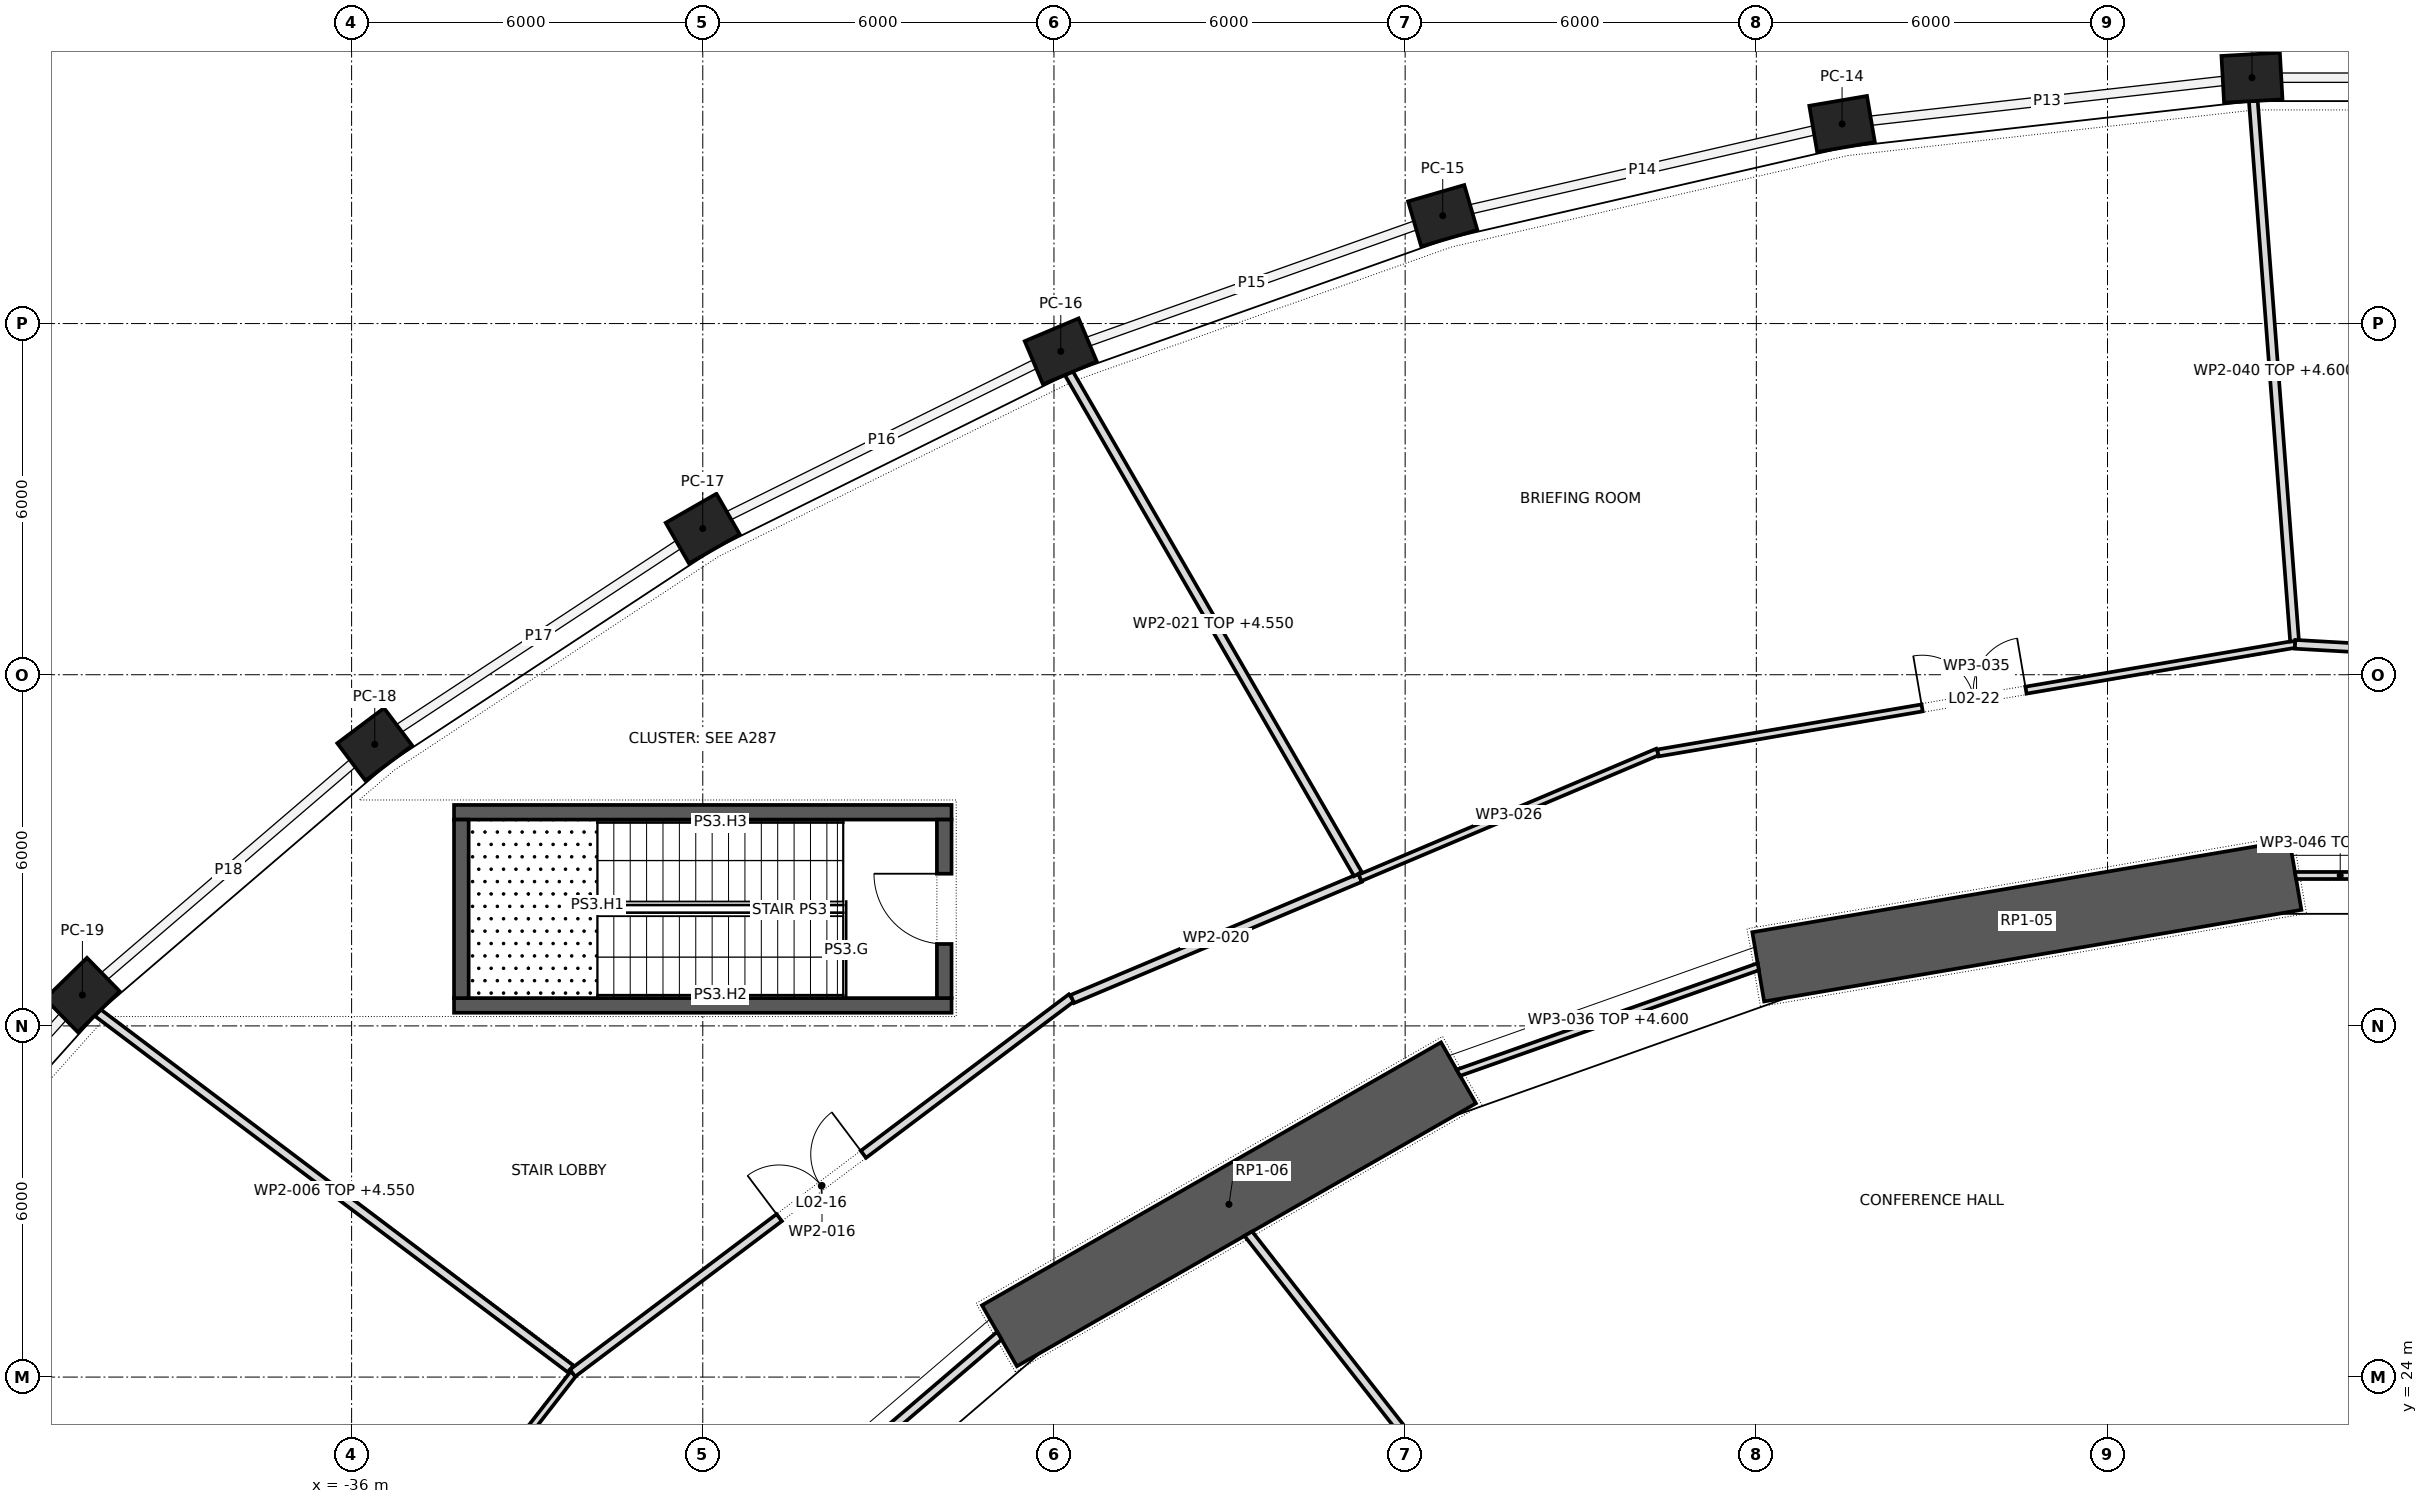
"""IFC4 building model, lengths in metres.
Left out: names, types, materials, properties, quantities, classifications, styles, units other than length and angle.
Written with IfcOpenShell. Run it as: python <this file> out.ifc"""

import sys

from ifc_helpers import new_model, si_unit, direction, frame, frame_2d, origin, origin_2d, place, context, subcontext, project, spatial, polyline, rectangle, outline, extrude, element, fill, save


model = new_model("IFC4")
c1 = context("Model", 3, precision=1e-05, world=origin(), true_north=direction((0.0, 1.0)))
c2 = subcontext(c1, "Body", "Model", "MODEL_VIEW")
j1 = project(units=[si_unit("LENGTHUNIT", "METRE"), si_unit("PLANEANGLEUNIT", "RADIAN")], contexts=[c1])
p1 = place(None, origin())
s1 = spatial("IfcSite", under=j1, at=p1, CompositionType="ELEMENT")
p2 = place(p1, origin())
s2 = spatial("IfcBuilding", under=s1, at=p2, CompositionType="ELEMENT")
p3 = place(p2, frame((0.0, 0.0, 12.5)))
s3 = spatial("IfcBuildingStorey", under=s2, at=p3, CompositionType="ELEMENT", Elevation=12.5)
for number, where, z_axis, x_axis in (
    (1, (-3.532, 46.201, 0.0), (0.0, 0.0, 1.0), (-0.998, -0.056, 0.0)),
    (2, (-10.535, 45.41, 0.0), (0.0, 0.0, 1.0), (-0.986, -0.168, 0.0)),
    (3, (-17.358, 43.843, 0.0), (0.0, 0.0, 1.0), (-0.96, -0.279, 0.0)),
    (4, (-23.884, 41.525, 0.0), (0.0, 0.0, 1.0), (-0.921, -0.389, 0.0)),
    (5, (-30.001, 38.497, 0.0), (0.0, 0.0, 1.0), (-0.868, -0.497, 0.0)),
    (6, (-35.605, 34.81, 0.0), (0.0, 0.0, 1.0), (-0.799, -0.601, 0.0)),
    (7, (-40.599, 30.528, 0.0), (0.0, 0.0, 1.0), (-0.715, -0.699, 0.0)),
):
    element("IfcColumn", number, at=place(p3, frame(where, z_axis=z_axis, x_axis=x_axis)), inside=s3, PredefinedType="COLUMN", context=c2, shape_type="SweptSolid", body=[
        extrude(rectangle(XDim=1.0, YDim=0.8, at=origin_2d()), origin(), (0.0, 0.0, 1.0), 5.5),
    ])
p4 = place(p3, frame((-2.788, 32.574, 0.0), z_axis=(0.0, 0.0, 1.0), x_axis=(-0.985776286846, -0.168062822456, 0.0)))
e8 = element("IfcWall", 8, at=p4, inside=s3, PredefinedType="SHEAR", context=c2, shape_type="SweptSolid", body=[
    extrude(rectangle(XDim=9.312, YDim=1.2, at=frame_2d((4.656, 0.0))), origin(), (0.0, 0.0, 1.0), 5.5),
])
p5 = place(p3, frame((-17.089, 29.198, 0.0), z_axis=(0.0, 0.0, 1.0), x_axis=(-0.867760656864, -0.496982336103, 0.0)))
e9 = element("IfcWall", 9, at=p5, inside=s3, PredefinedType="SHEAR", context=c2, shape_type="SweptSolid", body=[
    extrude(rectangle(XDim=9.038, YDim=1.2, at=frame_2d((4.519, 0.0))), origin(), (0.0, 0.0, 1.0), 5.5),
])
for number, where, z_axis, x_axis in (
    (10, (-34.25, 33.65, 0.0), (0.0, 0.0, 1.0), (1.0, 0.0, 0.0)),
    (11, (-34.25, 30.35, 0.0), (0.0, 0.0, 1.0), (1.0, 0.0, 0.0)),
):
    element("IfcWall", number, at=place(p3, frame(where, z_axis=z_axis, x_axis=x_axis)), inside=s3, PredefinedType="SHEAR", context=c2, shape_type="SweptSolid", body=[
        extrude(rectangle(XDim=8.5, YDim=0.25, at=frame_2d((4.25, 0.0))), origin(), (0.0, 0.0, 1.0), 5.15),
    ])
p6 = place(p3, frame((-34.125, 30.475, 0.0), z_axis=(0.0, 0.0, 1.0), x_axis=(0.0, 1.0, 0.0)))
e12 = element("IfcWall", 12, at=p6, inside=s3, PredefinedType="SHEAR", context=c2, shape_type="SweptSolid", body=[
    extrude(rectangle(XDim=3.05, YDim=0.25, at=frame_2d((1.525, 0.0))), origin(), (0.0, 0.0, 1.0), 5.15),
])
p7 = place(p3, frame((-25.875, 30.475, 0.0), z_axis=(0.0, 0.0, 1.0), x_axis=(0.0, 1.0, 0.0)))
e13 = element("IfcWall", 13, at=p7, inside=s3, PredefinedType="SHEAR", context=c2, shape_type="SweptSolid", body=[
    extrude(rectangle(XDim=3.05, YDim=0.25, at=frame_2d((1.525, 0.0))), origin(), (0.0, 0.0, 1.0), 5.15),
])
p8 = place(p7, frame((0.925, 0.0, 0.0)))
e14 = element("IfcOpeningElement", 14, at=p8, cuts=e13, PredefinedType="OPENING", context=c2, shape_type="SweptSolid", body=[
    extrude(rectangle(XDim=1.2, YDim=2.1, at=frame_2d((0.6, 1.05))), frame((0.0, 0.137, 0.0), z_axis=(0.0, -1.0, 0.0), x_axis=(1.0, 0.0, 0.0)), (0.0, 0.0, 1.0), 0.274),
])
p9 = place(p3, frame((-40.338, 30.225, 0.0), z_axis=(0.0, 0.0, 1.0), x_axis=(0.79878223103, -0.601620268435, 0.0)))
e15 = element("IfcWall", 15, at=p9, inside=s3, PredefinedType="PARTITIONING", context=c2, shape_type="SweptSolid", body=[
    extrude(outline(polyline([(-0.011, -0.075), (10.118, -0.075), (10.118, 0.075), (0.011, 0.075), (-0.011, -0.075)])), origin(), (0.0, 0.0, 1.0), 4.55),
])
p10 = place(p3, frame((-38.308, 16.228, 0.0), z_axis=(0.0, 0.0, 1.0), x_axis=(0.614374815397, 0.789014313055, 0.0)))
e16 = element("IfcWall", 16, at=p10, inside=s3, PredefinedType="PARTITIONING", context=c2, shape_type="SweptSolid", body=[
    extrude(rectangle(XDim=9.924, YDim=0.12, at=frame_2d((4.962, 0.0))), origin(), (0.0, 0.0, 1.0), 5.15),
])
p11 = place(p10, frame((4.052, 0.0, 0.0)))
e17 = element("IfcOpeningElement", 17, at=p11, cuts=e16, PredefinedType="OPENING", context=c2, shape_type="SweptSolid", body=[
    extrude(rectangle(XDim=1.8, YDim=2.1, at=frame_2d((0.9, 1.05))), frame((0.0, 0.072, 0.0), z_axis=(0.0, -1.0, 0.0), x_axis=(1.0, 0.0, 0.0)), (0.0, 0.0, 1.0), 0.144),
])
p12 = place(p3, frame((-32.225, 24.069, 0.0), z_axis=(0.0, 0.0, 1.0), x_axis=(0.799199975682, 0.601065220147, 0.0)))
e18 = element("IfcWall", 18, at=p12, inside=s3, PredefinedType="PARTITIONING", context=c2, shape_type="SweptSolid", body=[
    extrude(rectangle(XDim=10.666, YDim=0.15, at=frame_2d((5.333, 0.0))), origin(), (0.0, 0.0, 1.0), 5.15),
])
p13 = place(p12, frame((4.418, 0.0, 0.0)))
e19 = element("IfcOpeningElement", 19, at=p13, cuts=e18, PredefinedType="OPENING", context=c2, shape_type="SweptSolid", body=[
    extrude(rectangle(XDim=1.8, YDim=2.1, at=frame_2d((0.9, 1.05))), frame((0.0, 0.087, 0.0), z_axis=(0.0, -1.0, 0.0), x_axis=(1.0, 0.0, 0.0)), (0.0, 0.0, 1.0), 0.174),
])
p14 = place(p3, frame((-24.932, 24.708, 0.0), z_axis=(0.0, 0.0, 1.0), x_axis=(-0.760084552743, -0.649824185978, 0.0)))
e20 = element("IfcWall", 20, at=p14, inside=s3, PredefinedType="PARTITIONING", context=c2, shape_type="SweptSolid", body=[
    extrude(outline(polyline([(-0.014, -0.075), (5.09, -0.075), (5.06, 0.075), (0.014, 0.075), (-0.014, -0.075)])), origin(), (0.0, 0.0, 1.0), 4.6),
])
p15 = place(p3, frame((-23.687, 30.459, 0.0), z_axis=(0.0, 0.0, 1.0), x_axis=(0.921600059119, 0.388140864934, 0.0)))
e21 = element("IfcWall", 21, at=p15, inside=s3, PredefinedType="PARTITIONING", context=c2, shape_type="SweptSolid", body=[
    extrude(rectangle(XDim=5.336, YDim=0.15, at=frame_2d((2.668, 0.0))), origin(), (0.0, 0.0, 1.0), 5.15),
])
p16 = place(p3, frame((-23.745, 41.15, 0.0), z_axis=(0.0, 0.0, 1.0), x_axis=(0.49985011379, -0.866111923336, 0.0)))
e22 = element("IfcWall", 22, at=p16, inside=s3, PredefinedType="PARTITIONING", context=c2, shape_type="SweptSolid", body=[
    extrude(outline(polyline([(-0.009, -0.075), (9.878, -0.075), (9.878, 0.075), (0.009, 0.075), (-0.009, -0.075)])), origin(), (0.0, 0.0, 1.0), 4.55),
])
p17 = place(p3, frame((-20.68, 26.45, 0.0), z_axis=(0.0, 0.0, 1.0), x_axis=(0.616461511357, -0.787385042413, 0.0)))
e23 = element("IfcWall", 23, at=p17, inside=s3, PredefinedType="PARTITIONING", context=c2, shape_type="SweptSolid", body=[
    extrude(outline(polyline([(-0.011, -0.075), (14.518, -0.075), (14.518, 0.075), (0.011, 0.075), (-0.011, -0.075)])), origin(), (0.0, 0.0, 1.0), 5.15),
])
p18 = place(p3, frame((-18.77, 32.53, 0.0), z_axis=(0.0, 0.0, 1.0), x_axis=(0.920949546313, 0.389681835792, 0.0)))
e24 = element("IfcWall", 24, at=p18, inside=s3, PredefinedType="PARTITIONING", context=c2, shape_type="SweptSolid", body=[
    extrude(rectangle(XDim=5.52, YDim=0.12, at=frame_2d((2.76, 0.0))), origin(), (0.0, 0.0, 1.0), 5.15),
])
p19 = place(p3, frame((-13.68, 34.664, 0.0), z_axis=(0.0, 0.0, 1.0), x_axis=(0.985752612564, 0.168201625505, 0.0)))
e25 = element("IfcWall", 25, at=p19, inside=s3, PredefinedType="PARTITIONING", context=c2, shape_type="SweptSolid", body=[
    extrude(rectangle(XDim=11.043, YDim=0.12, at=frame_2d((5.521, 0.0))), origin(), (0.0, 0.0, 1.0), 5.15),
])
p20 = place(p19, frame((4.578, 0.0, 0.0)))
e26 = element("IfcOpeningElement", 26, at=p20, cuts=e25, PredefinedType="OPENING", context=c2, shape_type="SweptSolid", body=[
    extrude(rectangle(XDim=1.8, YDim=2.1, at=frame_2d((0.9, 1.05))), frame((0.0, 0.072, 0.0), z_axis=(0.0, -1.0, 0.0), x_axis=(1.0, 0.0, 0.0)), (0.0, 0.0, 1.0), 0.144),
])
p21 = place(p3, frame((-11.967, 31.011, 0.0), z_axis=(0.0, 0.0, 1.0), x_axis=(-0.942814385805, -0.333318217204, 0.0)))
e27 = element("IfcWall", 27, at=p21, inside=s3, PredefinedType="PARTITIONING", context=c2, shape_type="SweptSolid", body=[
    extrude(outline(polyline([(-0.01, -0.06), (5.446, -0.06), (5.424, 0.06), (0.01, 0.06), (-0.01, -0.06)])), origin(), (0.0, 0.0, 1.0), 4.6),
])
p22 = place(p3, frame((-2.804, 36.573, 0.0), z_axis=(0.0, 0.0, 1.0), x_axis=(-0.076121640679, 0.997098538671, 0.0)))
e28 = element("IfcWall", 28, at=p22, inside=s3, PredefinedType="PARTITIONING", context=c2, shape_type="SweptSolid", body=[
    extrude(outline(polyline([(0.0, -0.075), (9.255, -0.075), (9.258, 0.075), (0.0, 0.075), (0.0, -0.075)])), origin(), (0.0, 0.0, 1.0), 4.6),
])
p23 = place(p3, frame((-2.795, 36.52, 0.0), z_axis=(0.0, 0.0, 1.0), x_axis=(0.998407334581, -0.056416258786, 0.0)))
e29 = element("IfcWall", 29, at=p23, inside=s3, PredefinedType="PARTITIONING", context=c2, shape_type="SweptSolid", body=[
    extrude(rectangle(XDim=11.26, YDim=0.15, at=frame_2d((5.63, 0.0))), origin(), (0.0, 0.0, 1.0), 5.15),
])
p24 = place(p23, frame((4.679, 0.0, 0.0)))
e30 = element("IfcOpeningElement", 30, at=p24, cuts=e29, PredefinedType="OPENING", context=c2, shape_type="SweptSolid", body=[
    extrude(rectangle(XDim=1.8, YDim=2.1, at=frame_2d((0.9, 1.05))), frame((0.0, 0.087, 0.0), z_axis=(0.0, -1.0, 0.0), x_axis=(1.0, 0.0, 0.0)), (0.0, 0.0, 1.0), 0.174),
])
p25 = place(p3, frame((-1.26, 32.57, 0.0), z_axis=(0.0, 0.0, 1.0), x_axis=(-1.0, 0.0, 0.0)))
e31 = element("IfcWall", 31, at=p25, inside=s3, PredefinedType="PARTITIONING", context=c2, shape_type="SweptSolid", body=[
    extrude(outline(polyline([(0.0, -0.06), (1.538, -0.06), (1.518, 0.06), (0.0, 0.06), (0.0, -0.06)])), origin(), (0.0, 0.0, 1.0), 4.6),
])
p26 = place(p8, origin())
e32 = element("IfcDoor", 32, at=p26, inside=s3, OperationType="SINGLE_SWING_LEFT", PredefinedType="DOOR", context=c2, shape_type="SweptSolid", body=[
    extrude(rectangle(XDim=1.2, YDim=2.1, at=frame_2d((0.6, 1.05))), frame((0.0, 0.025, 0.0), z_axis=(0.0, -1.0, 0.0), x_axis=(1.0, 0.0, 0.0)), (0.0, 0.0, 1.0), 0.05),
])
fill(e14, e32)
p27 = place(p13, origin())
e33 = element("IfcDoor", 33, at=p27, inside=s3, OperationType="DOUBLE_DOOR_SINGLE_SWING", PredefinedType="DOOR", context=c2, shape_type="SweptSolid", body=[
    extrude(rectangle(XDim=1.8, YDim=2.1, at=frame_2d((0.9, 1.05))), frame((0.0, 0.025, 0.0), z_axis=(0.0, -1.0, 0.0), x_axis=(1.0, 0.0, 0.0)), (0.0, 0.0, 1.0), 0.05),
])
fill(e19, e33)
p28 = place(p20, origin())
e34 = element("IfcDoor", 34, at=p28, inside=s3, OperationType="DOUBLE_DOOR_SINGLE_SWING", PredefinedType="DOOR", context=c2, shape_type="SweptSolid", body=[
    extrude(rectangle(XDim=1.8, YDim=2.1, at=frame_2d((0.9, 1.05))), frame((0.0, 0.025, 0.0), z_axis=(0.0, -1.0, 0.0), x_axis=(1.0, 0.0, 0.0)), (0.0, 0.0, 1.0), 0.05),
])
fill(e26, e34)
save(model, sys.argv[1])
